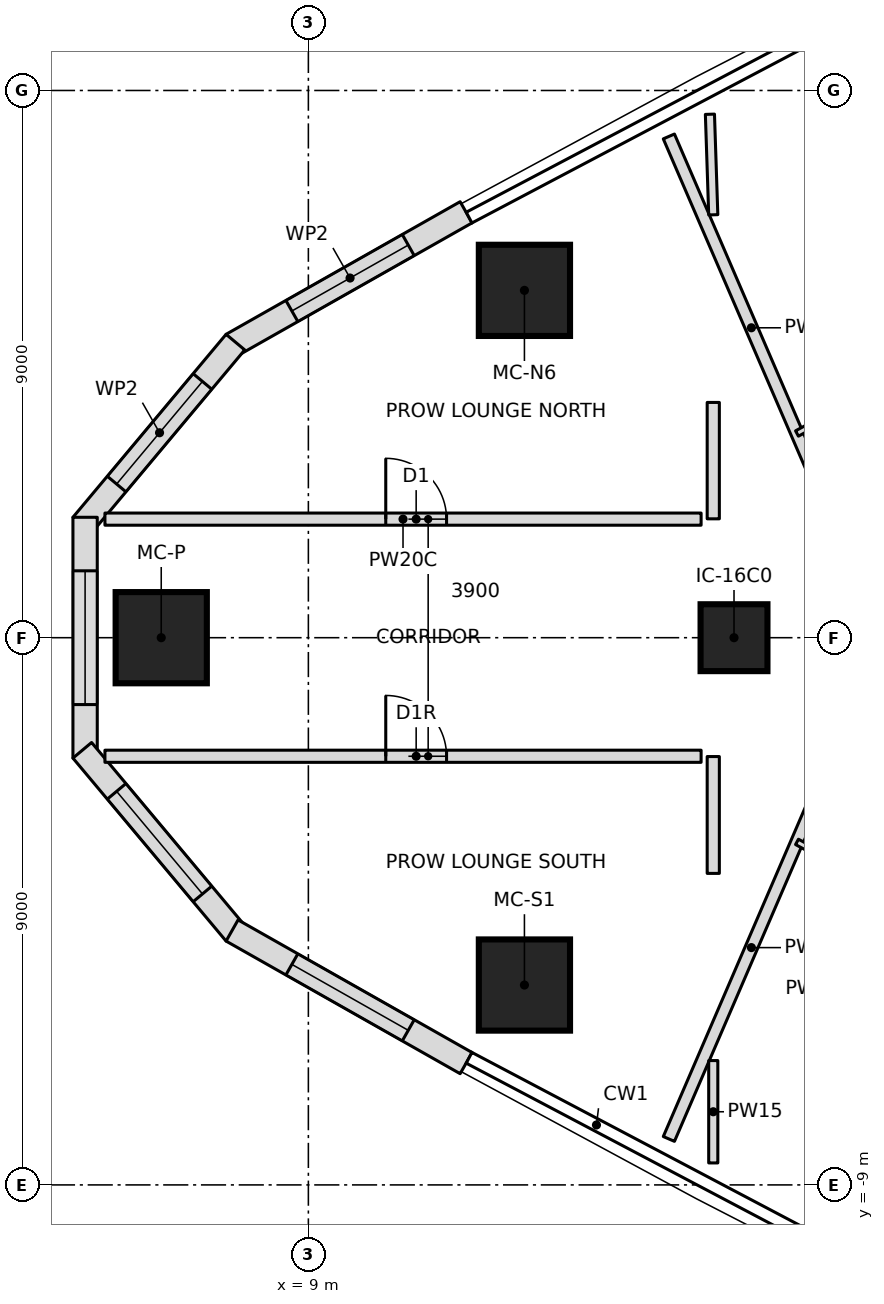
"""IFC4 building model, lengths in metres.
Left out: names, types, materials, properties, quantities, classifications, styles, units other than length and angle.
Written with IfcOpenShell. Run it as: python <this file> out.ifc"""

import sys

from ifc_helpers import new_model, si_unit, direction, frame, frame_2d, origin, origin_2d, place, context, subcontext, project, spatial, polyline, rectangle, outline, extrude, element, fill, save


model = new_model("IFC4")
c1 = context("Model", 3, precision=1e-05, world=origin(), true_north=direction((0.0, 1.0)))
c2 = subcontext(c1, "Body", "Model", "MODEL_VIEW")
j1 = project(units=[si_unit("LENGTHUNIT", "METRE"), si_unit("PLANEANGLEUNIT", "RADIAN")], contexts=[c1])
p1 = place(None, origin())
s1 = spatial("IfcSite", under=j1, at=p1, CompositionType="ELEMENT")
p2 = place(p1, origin())
s2 = spatial("IfcBuilding", under=s1, at=p2, CompositionType="ELEMENT")
p3 = place(p2, frame((0.0, 0.0, 155.05)))
s3 = spatial("IfcBuildingStorey", under=s2, at=p3, CompositionType="ELEMENT", Elevation=155.05)
for number, where, z_axis, x_axis in (
    (1, (6.58, 0.0, 0.0), (0.0, 0.0, 1.0), (1.0, 0.0, 0.0)),
    (2, (12.553, -5.713, 0.0), (0.0, 0.0, 1.0), (1.0, 0.0, 0.0)),
    (3, (12.553, 5.713, 0.0), (0.0, 0.0, 1.0), (1.0, 0.0, 0.0)),
):
    element("IfcColumn", number, at=place(p3, frame(where, z_axis=z_axis, x_axis=x_axis)), inside=s3, PredefinedType="COLUMN", context=c2, shape_type="SweptSolid", body=[
        extrude(rectangle(XDim=1.5, YDim=1.5, at=origin_2d()), origin(), (0.0, 0.0, 1.0), 3.55),
    ])
p4 = place(p3, frame((16.0, 0.0, 0.0), z_axis=(0.0, 0.0, 1.0), x_axis=(1.0, 0.0, 0.0)))
e4 = element("IfcColumn", 4, at=p4, inside=s3, PredefinedType="COLUMN", context=c2, shape_type="SweptSolid", body=[
    extrude(rectangle(XDim=1.1, YDim=1.1, at=origin_2d()), origin(), (0.0, 0.0, 1.0), 3.55),
])
p5 = place(p3, frame((11.594, 6.997, 0.0), z_axis=(0.0, 0.0, 1.0), x_axis=(-0.870045255208, -0.492971859125, 0.0)))
e5 = element("IfcWall", 5, at=p5, inside=s3, PredefinedType="NOTDEFINED", context=c2, shape_type="SweptSolid", body=[
    extrude(outline(polyline([(0.0, -0.2), (4.424, -0.2), (4.352, 0.2), (0.0, 0.2), (0.0, -0.2)])), origin(), (0.0, 0.0, 1.0), 3.25),
])
p6 = place(p5, frame((1.094, 0.0, 0.6)))
e6 = element("IfcOpeningElement", 6, at=p6, cuts=e5, PredefinedType="OPENING", context=c2, shape_type="SweptSolid", body=[
    extrude(outline(polyline([(0.0, 1.35), (0.084, 1.771), (0.322, 2.128), (0.679, 2.366), (1.1, 2.45), (1.521, 2.366), (1.878, 2.128), (2.116, 1.771), (2.2, 1.35), (2.2, 1.1), (2.116, 0.679), (1.878, 0.322), (1.521, 0.084), (1.1, 0.0), (0.679, 0.084), (0.322, 0.322), (0.084, 0.679), (0.0, 1.1), (0.0, 1.35)])), frame((0.0, 0.21, 0.0), z_axis=(0.0, -1.0, 0.0), x_axis=(1.0, 0.0, 0.0)), (0.0, 0.0, 1.0), 0.42),
])
p7 = place(p3, frame((7.777, 4.834, 0.0), z_axis=(0.0, 0.0, 1.0), x_axis=(-0.641787918235, -0.766882173484, 0.0)))
e7 = element("IfcWall", 7, at=p7, inside=s3, PredefinedType="NOTDEFINED", context=c2, shape_type="SweptSolid", body=[
    extrude(outline(polyline([(-0.036, -0.2), (3.888, -0.2), (3.743, 0.2), (0.036, 0.2), (-0.036, -0.2)])), origin(), (0.0, 0.0, 1.0), 3.25),
])
p8 = place(p7, frame((0.808, 0.0, 0.6)))
e8 = element("IfcOpeningElement", 8, at=p8, cuts=e7, PredefinedType="OPENING", context=c2, shape_type="SweptSolid", body=[
    extrude(outline(polyline([(0.0, 1.35), (0.084, 1.771), (0.322, 2.128), (0.679, 2.366), (1.1, 2.45), (1.521, 2.366), (1.878, 2.128), (2.116, 1.771), (2.2, 1.35), (2.2, 1.1), (2.116, 0.679), (1.878, 0.322), (1.521, 0.084), (1.1, 0.0), (0.679, 0.084), (0.322, 0.322), (0.084, 0.679), (0.0, 1.1), (0.0, 1.35)])), frame((0.0, 0.21, 0.0), z_axis=(0.0, -1.0, 0.0), x_axis=(1.0, 0.0, 0.0)), (0.0, 0.0, 1.0), 0.42),
])
p9 = place(p3, frame((5.328, 1.908, 0.0), z_axis=(0.0, 0.0, 1.0), x_axis=(0.0, -1.0, 0.0)))
e9 = element("IfcWall", 9, at=p9, inside=s3, PredefinedType="NOTDEFINED", context=c2, shape_type="SweptSolid", body=[
    extrude(outline(polyline([(-0.073, -0.2), (3.888, -0.2), (3.743, 0.2), (0.073, 0.2), (-0.073, -0.2)])), origin(), (0.0, 0.0, 1.0), 3.25),
])
p10 = place(p9, frame((0.808, 0.0, 0.6)))
e10 = element("IfcOpeningElement", 10, at=p10, cuts=e9, PredefinedType="OPENING", context=c2, shape_type="SweptSolid", body=[
    extrude(outline(polyline([(0.0, 1.35), (0.084, 1.771), (0.322, 2.128), (0.679, 2.366), (1.1, 2.45), (1.521, 2.366), (1.878, 2.128), (2.116, 1.771), (2.2, 1.35), (2.2, 1.1), (2.116, 0.679), (1.878, 0.322), (1.521, 0.084), (1.1, 0.0), (0.679, 0.084), (0.322, 0.322), (0.084, 0.679), (0.0, 1.1), (0.0, 1.35)])), frame((0.0, 0.21, 0.0), z_axis=(0.0, -1.0, 0.0), x_axis=(1.0, 0.0, 0.0)), (0.0, 0.0, 1.0), 0.42),
])
p11 = place(p3, frame((5.328, -1.908, 0.0), z_axis=(0.0, 0.0, 1.0), x_axis=(0.641787918235, -0.766882173484, 0.0)))
e11 = element("IfcWall", 11, at=p11, inside=s3, PredefinedType="NOTDEFINED", context=c2, shape_type="SweptSolid", body=[
    extrude(outline(polyline([(-0.073, -0.2), (3.852, -0.2), (3.779, 0.2), (0.073, 0.2), (-0.073, -0.2)])), origin(), (0.0, 0.0, 1.0), 3.25),
])
p12 = place(p11, frame((0.808, 0.0, 0.6)))
e12 = element("IfcOpeningElement", 12, at=p12, cuts=e11, PredefinedType="OPENING", context=c2, shape_type="SweptSolid", body=[
    extrude(outline(polyline([(0.0, 1.35), (0.084, 1.771), (0.322, 2.128), (0.679, 2.366), (1.1, 2.45), (1.521, 2.366), (1.878, 2.128), (2.116, 1.771), (2.2, 1.35), (2.2, 1.1), (2.116, 0.679), (1.878, 0.322), (1.521, 0.084), (1.1, 0.0), (0.679, 0.084), (0.322, 0.322), (0.084, 0.679), (0.0, 1.1), (0.0, 1.35)])), frame((0.0, 0.21, 0.0), z_axis=(0.0, -1.0, 0.0), x_axis=(1.0, 0.0, 0.0)), (0.0, 0.0, 1.0), 0.42),
])
p13 = place(p3, frame((7.777, -4.834, 0.0), z_axis=(0.0, 0.0, 1.0), x_axis=(0.870045255208, -0.492971859125, 0.0)))
e13 = element("IfcWall", 13, at=p13, inside=s3, PredefinedType="NOTDEFINED", context=c2, shape_type="SweptSolid", body=[
    extrude(outline(polyline([(-0.036, -0.2), (4.388, -0.2), (4.388, 0.2), (0.036, 0.2), (-0.036, -0.2)])), origin(), (0.0, 0.0, 1.0), 3.25),
])
p14 = place(p13, frame((1.094, 0.0, 0.6)))
e14 = element("IfcOpeningElement", 14, at=p14, cuts=e13, PredefinedType="OPENING", context=c2, shape_type="SweptSolid", body=[
    extrude(outline(polyline([(0.0, 1.35), (0.084, 1.771), (0.322, 2.128), (0.679, 2.366), (1.1, 2.45), (1.521, 2.366), (1.878, 2.128), (2.116, 1.771), (2.2, 1.35), (2.2, 1.1), (2.116, 0.679), (1.878, 0.322), (1.521, 0.084), (1.1, 0.0), (0.679, 0.084), (0.322, 0.322), (0.084, 0.679), (0.0, 1.1), (0.0, 1.35)])), frame((0.0, 0.21, 0.0), z_axis=(0.0, -1.0, 0.0), x_axis=(1.0, 0.0, 0.0)), (0.0, 0.0, 1.0), 0.42),
])
p15 = place(p3, frame((5.654, 1.95, 0.0), z_axis=(0.0, 0.0, 1.0), x_axis=(1.0, 0.0, 0.0)))
e15 = element("IfcWall", 15, at=p15, inside=s3, PredefinedType="PARTITIONING", context=c2, shape_type="SweptSolid", body=[
    extrude(rectangle(XDim=9.804, YDim=0.2, at=frame_2d((4.902, 0.0))), origin(), (0.0, 0.0, 1.0), 3.25),
])
p16 = place(p15, frame((4.618, 0.0, 0.0)))
e16 = element("IfcOpeningElement", 16, at=p16, cuts=e15, PredefinedType="OPENING", context=c2, shape_type="SweptSolid", body=[
    extrude(rectangle(XDim=1.0, YDim=2.1, at=frame_2d((0.5, 1.05))), frame((0.0, 0.11, 0.0), z_axis=(0.0, -1.0, 0.0), x_axis=(1.0, 0.0, 0.0)), (0.0, 0.0, 1.0), 0.22),
])
p17 = place(p3, frame((5.654, -1.95, 0.0), z_axis=(0.0, 0.0, 1.0), x_axis=(1.0, 0.0, 0.0)))
e17 = element("IfcWall", 17, at=p17, inside=s3, PredefinedType="PARTITIONING", context=c2, shape_type="SweptSolid", body=[
    extrude(rectangle(XDim=9.804, YDim=0.2, at=frame_2d((4.902, 0.0))), origin(), (0.0, 0.0, 1.0), 3.25),
])
p18 = place(p17, frame((4.618, 0.0, 0.0)))
e18 = element("IfcOpeningElement", 18, at=p18, cuts=e17, PredefinedType="OPENING", context=c2, shape_type="SweptSolid", body=[
    extrude(rectangle(XDim=1.0, YDim=2.1, at=frame_2d((0.5, 1.05))), frame((0.0, 0.11, 0.0), z_axis=(0.0, -1.0, 0.0), x_axis=(1.0, 0.0, 0.0)), (0.0, 0.0, 1.0), 0.22),
])
p19 = place(p3, frame((17.643, 1.95, 0.0), z_axis=(0.0, 0.0, 1.0), x_axis=(-0.395994543879, 0.918252863441, 0.0)))
e19 = element("IfcWall", 19, at=p19, inside=s3, PredefinedType="PARTITIONING", context=c2, shape_type="SweptSolid", body=[
    extrude(rectangle(XDim=6.854, YDim=0.2, at=frame_2d((3.427, 0.0))), origin(), (0.0, 0.0, 1.0), 3.25),
])
p20 = place(p3, frame((17.036, 3.358, 0.0), z_axis=(0.0, 0.0, 1.0), x_axis=(0.879823588489, 0.475300382009, 0.0)))
e20 = element("IfcWall", 20, at=p20, inside=s3, PredefinedType="PARTITIONING", context=c2, shape_type="SweptSolid", body=[
    extrude(rectangle(XDim=1.273, YDim=0.1, at=frame_2d((0.636, 0.0))), origin(), (0.0, 0.0, 1.0), 3.25),
])
p21 = place(p3, frame((14.929, -8.244, 0.0), z_axis=(0.0, 0.0, 1.0), x_axis=(0.395994543879, 0.918252863441, 0.0)))
e21 = element("IfcWall", 21, at=p21, inside=s3, PredefinedType="PARTITIONING", context=c2, shape_type="SweptSolid", body=[
    extrude(rectangle(XDim=6.854, YDim=0.2, at=frame_2d((3.427, 0.0))), origin(), (0.0, 0.0, 1.0), 3.25),
])
p22 = place(p3, frame((18.156, -3.963, 0.0), z_axis=(0.0, 0.0, 1.0), x_axis=(-0.879823588489, 0.475300382009, 0.0)))
e22 = element("IfcWall", 22, at=p22, inside=s3, PredefinedType="PARTITIONING", context=c2, shape_type="SweptSolid", body=[
    extrude(rectangle(XDim=1.273, YDim=0.1, at=frame_2d((0.636, 0.0))), origin(), (0.0, 0.0, 1.0), 3.25),
])
p23 = place(p3, frame((15.604, 8.609, 0.0), z_axis=(0.0, 0.0, 1.0), x_axis=(0.033196927484, -0.999448830109, 0.0)))
e23 = element("IfcWall", 23, at=p23, inside=s3, PredefinedType="PARTITIONING", context=c2, shape_type="SweptSolid", body=[
    extrude(rectangle(XDim=1.655, YDim=0.15, at=frame_2d((0.827, 0.0))), origin(), (0.0, 0.0, 1.0), 3.25),
])
p24 = place(p3, frame((15.659, -6.955, 0.0), z_axis=(0.0, 0.0, 1.0), x_axis=(0.0, -1.0, 0.0)))
e24 = element("IfcWall", 24, at=p24, inside=s3, PredefinedType="PARTITIONING", context=c2, shape_type="SweptSolid", body=[
    extrude(rectangle(XDim=1.684, YDim=0.15, at=frame_2d((0.842, 0.0))), origin(), (0.0, 0.0, 1.0), 3.25),
])
p25 = place(p3, frame((15.659, 3.869, 0.0), z_axis=(0.0, 0.0, 1.0), x_axis=(0.0, -1.0, 0.0)))
e25 = element("IfcWall", 25, at=p25, inside=s3, PredefinedType="PARTITIONING", context=c2, shape_type="SweptSolid", body=[
    extrude(rectangle(XDim=1.914, YDim=0.2, at=frame_2d((0.957, 0.0))), origin(), (0.0, 0.0, 1.0), 3.25),
])
p26 = place(p3, frame((15.659, -1.955, 0.0), z_axis=(0.0, 0.0, 1.0), x_axis=(0.0, -1.0, 0.0)))
e26 = element("IfcWall", 26, at=p26, inside=s3, PredefinedType="PARTITIONING", context=c2, shape_type="SweptSolid", body=[
    extrude(rectangle(XDim=1.922, YDim=0.2, at=frame_2d((0.961, 0.0))), origin(), (0.0, 0.0, 1.0), 3.25),
])
p27 = place(p6, origin())
e27 = element("IfcWindow", 27, at=p27, inside=s3, PartitioningType="SINGLE_PANEL", PredefinedType="WINDOW", context=c2, shape_type="SweptSolid", body=[
    extrude(outline(polyline([(0.0, 1.35), (0.084, 1.771), (0.322, 2.128), (0.679, 2.366), (1.1, 2.45), (1.521, 2.366), (1.878, 2.128), (2.116, 1.771), (2.2, 1.35), (2.2, 1.1), (2.116, 0.679), (1.878, 0.322), (1.521, 0.084), (1.1, 0.0), (0.679, 0.084), (0.322, 0.322), (0.084, 0.679), (0.0, 1.1), (0.0, 1.35)])), frame((0.0, 0.17, 0.0), z_axis=(0.0, -1.0, 0.0), x_axis=(1.0, 0.0, 0.0)), (0.0, 0.0, 1.0), 0.06),
])
fill(e6, e27)
p28 = place(p8, origin())
e28 = element("IfcWindow", 28, at=p28, inside=s3, PartitioningType="SINGLE_PANEL", PredefinedType="WINDOW", context=c2, shape_type="SweptSolid", body=[
    extrude(outline(polyline([(0.0, 1.35), (0.084, 1.771), (0.322, 2.128), (0.679, 2.366), (1.1, 2.45), (1.521, 2.366), (1.878, 2.128), (2.116, 1.771), (2.2, 1.35), (2.2, 1.1), (2.116, 0.679), (1.878, 0.322), (1.521, 0.084), (1.1, 0.0), (0.679, 0.084), (0.322, 0.322), (0.084, 0.679), (0.0, 1.1), (0.0, 1.35)])), frame((0.0, 0.17, 0.0), z_axis=(0.0, -1.0, 0.0), x_axis=(1.0, 0.0, 0.0)), (0.0, 0.0, 1.0), 0.06),
])
fill(e8, e28)
p29 = place(p10, origin())
e29 = element("IfcWindow", 29, at=p29, inside=s3, PartitioningType="SINGLE_PANEL", PredefinedType="WINDOW", context=c2, shape_type="SweptSolid", body=[
    extrude(outline(polyline([(0.0, 1.35), (0.084, 1.771), (0.322, 2.128), (0.679, 2.366), (1.1, 2.45), (1.521, 2.366), (1.878, 2.128), (2.116, 1.771), (2.2, 1.35), (2.2, 1.1), (2.116, 0.679), (1.878, 0.322), (1.521, 0.084), (1.1, 0.0), (0.679, 0.084), (0.322, 0.322), (0.084, 0.679), (0.0, 1.1), (0.0, 1.35)])), frame((0.0, 0.17, 0.0), z_axis=(0.0, -1.0, 0.0), x_axis=(1.0, 0.0, 0.0)), (0.0, 0.0, 1.0), 0.06),
])
fill(e10, e29)
p30 = place(p12, origin())
e30 = element("IfcWindow", 30, at=p30, inside=s3, PartitioningType="SINGLE_PANEL", PredefinedType="WINDOW", context=c2, shape_type="SweptSolid", body=[
    extrude(outline(polyline([(0.0, 1.35), (0.084, 1.771), (0.322, 2.128), (0.679, 2.366), (1.1, 2.45), (1.521, 2.366), (1.878, 2.128), (2.116, 1.771), (2.2, 1.35), (2.2, 1.1), (2.116, 0.679), (1.878, 0.322), (1.521, 0.084), (1.1, 0.0), (0.679, 0.084), (0.322, 0.322), (0.084, 0.679), (0.0, 1.1), (0.0, 1.35)])), frame((0.0, 0.17, 0.0), z_axis=(0.0, -1.0, 0.0), x_axis=(1.0, 0.0, 0.0)), (0.0, 0.0, 1.0), 0.06),
])
fill(e12, e30)
p31 = place(p14, origin())
e31 = element("IfcWindow", 31, at=p31, inside=s3, PartitioningType="SINGLE_PANEL", PredefinedType="WINDOW", context=c2, shape_type="SweptSolid", body=[
    extrude(outline(polyline([(0.0, 1.35), (0.084, 1.771), (0.322, 2.128), (0.679, 2.366), (1.1, 2.45), (1.521, 2.366), (1.878, 2.128), (2.116, 1.771), (2.2, 1.35), (2.2, 1.1), (2.116, 0.679), (1.878, 0.322), (1.521, 0.084), (1.1, 0.0), (0.679, 0.084), (0.322, 0.322), (0.084, 0.679), (0.0, 1.1), (0.0, 1.35)])), frame((0.0, 0.17, 0.0), z_axis=(0.0, -1.0, 0.0), x_axis=(1.0, 0.0, 0.0)), (0.0, 0.0, 1.0), 0.06),
])
fill(e14, e31)
p32 = place(p16, origin())
e32 = element("IfcDoor", 32, at=p32, inside=s3, OperationType="SINGLE_SWING_LEFT", PredefinedType="DOOR", context=c2, shape_type="SweptSolid", body=[
    extrude(rectangle(XDim=1.0, YDim=2.1, at=frame_2d((0.5, 1.05))), frame((0.0, 0.025, 0.0), z_axis=(0.0, -1.0, 0.0), x_axis=(1.0, 0.0, 0.0)), (0.0, 0.0, 1.0), 0.05),
])
fill(e16, e32)
p33 = place(p18, origin())
e33 = element("IfcDoor", 33, at=p33, inside=s3, OperationType="SINGLE_SWING_RIGHT", PredefinedType="DOOR", context=c2, shape_type="SweptSolid", body=[
    extrude(rectangle(XDim=1.0, YDim=2.1, at=frame_2d((0.5, 1.05))), frame((0.0, 0.025, 0.0), z_axis=(0.0, -1.0, 0.0), x_axis=(1.0, 0.0, 0.0)), (0.0, 0.0, 1.0), 0.05),
])
fill(e18, e33)
save(model, sys.argv[1])
